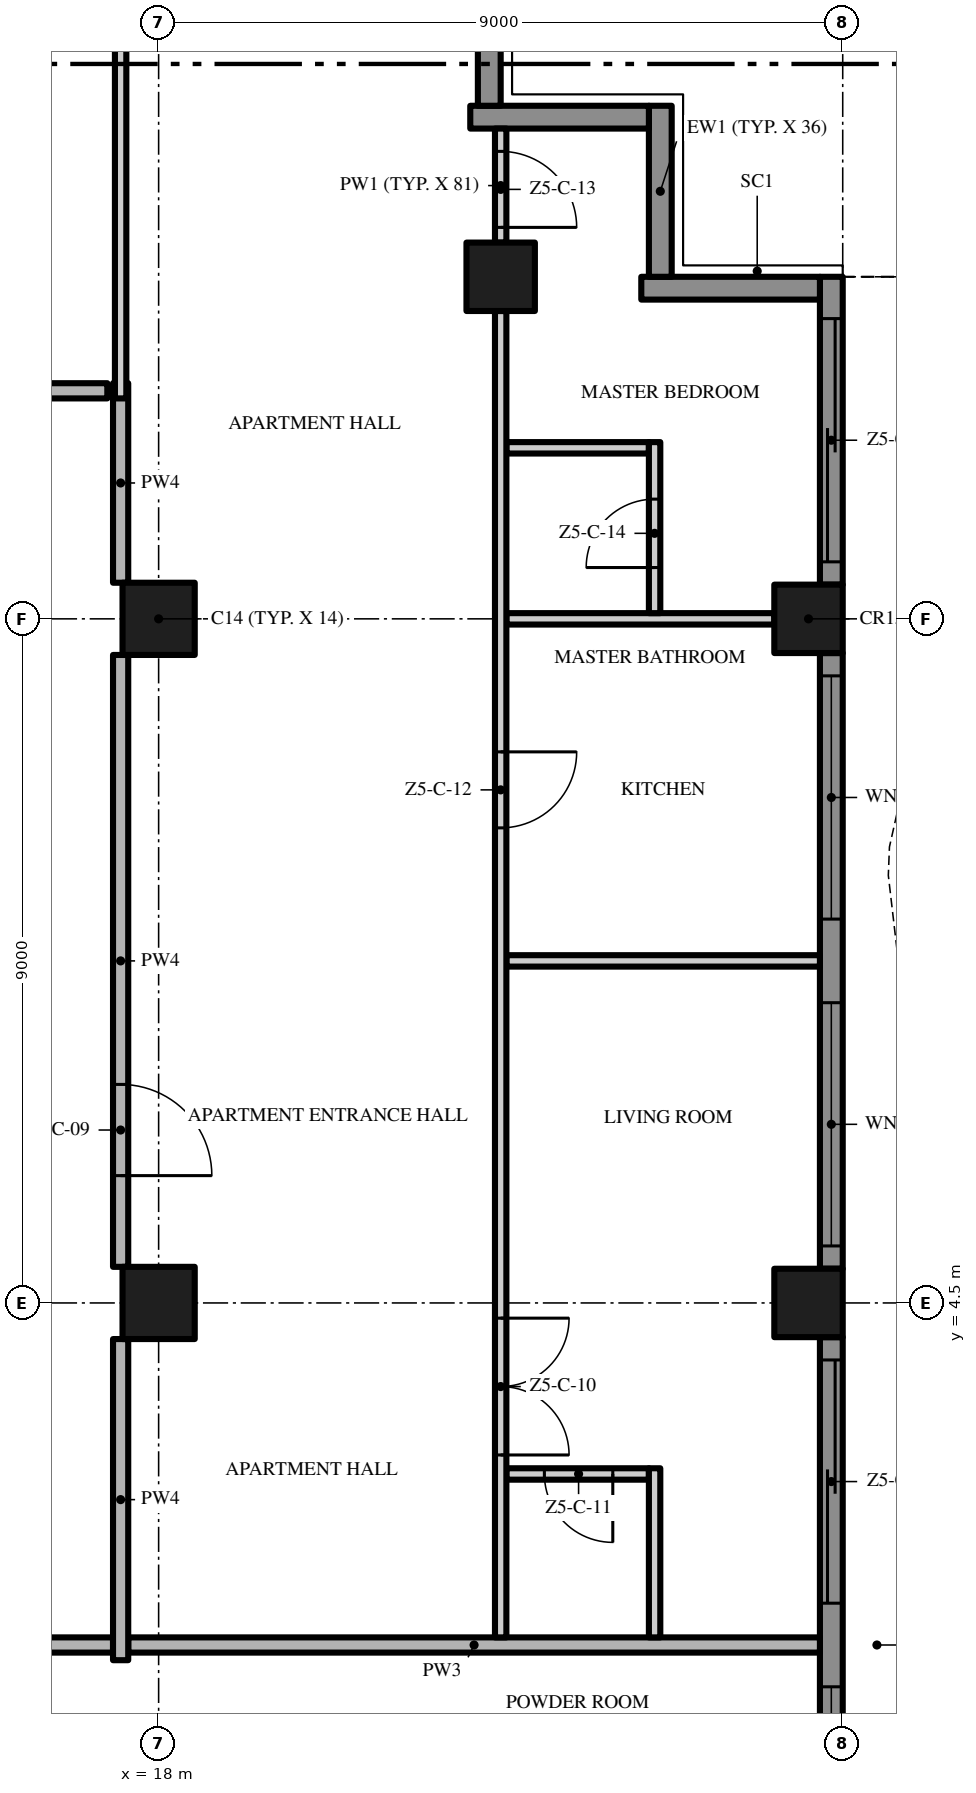
"""IFC4 building model, lengths in metres.
Left out: names, types, materials, properties, quantities, classifications, styles, units other than length and angle.
Written with IfcOpenShell. Run it as: python <this file> out.ifc"""

import sys

from ifc_helpers import new_model, si_unit, direction, frame, frame_2d, origin, origin_2d, place, context, subcontext, project, spatial, polyline, rectangle, outline, extrude, element, fill, save


model = new_model("IFC4")
c1 = context("Model", 3, precision=1e-05, world=origin(), true_north=direction((0.0, 1.0)))
c2 = subcontext(c1, "Body", "Model", "MODEL_VIEW")
j1 = project(units=[si_unit("LENGTHUNIT", "METRE"), si_unit("PLANEANGLEUNIT", "RADIAN")], contexts=[c1])
p1 = place(None, origin())
s1 = spatial("IfcSite", under=j1, at=p1, CompositionType="ELEMENT")
p2 = place(p1, origin())
s2 = spatial("IfcBuilding", under=s1, at=p2, CompositionType="ELEMENT")
p3 = place(p2, frame((0.0, 0.0, 269.2)))
s3 = spatial("IfcBuildingStorey", under=s2, at=p3, CompositionType="ELEMENT", Elevation=269.2)
for number, where, z_axis, x_axis in (
    (1, (18.0, 13.5, 0.0), (0.0, 0.0, 1.0), (1.0, 0.0, 0.0)),
    (2, (18.0, 4.5, 0.0), (0.0, 0.0, 1.0), (1.0, 0.0, 0.0)),
):
    element("IfcColumn", number, at=place(p3, frame(where, z_axis=z_axis, x_axis=x_axis)), inside=s3, PredefinedType="COLUMN", context=c2, shape_type="SweptSolid", body=[
        extrude(rectangle(XDim=0.95, YDim=0.95, at=origin_2d()), origin(), (0.0, 0.0, 1.0), 3.5),
    ])
for number, where, z_axis, x_axis in (
    (3, (26.55, 13.5, 0.0), (0.0, 0.0, 1.0), (1.0, 0.0, 0.0)),
    (4, (22.5, 18.0, 0.0), (0.0, 0.0, 1.0), (1.0, 0.0, 0.0)),
    (5, (26.55, 4.5, 0.0), (0.0, 0.0, 1.0), (1.0, 0.0, 0.0)),
):
    element("IfcColumn", number, at=place(p3, frame(where, z_axis=z_axis, x_axis=x_axis)), inside=s3, PredefinedType="COLUMN", context=c2, shape_type="SweptSolid", body=[
        extrude(rectangle(XDim=0.9, YDim=0.9, at=origin_2d()), origin(), (0.0, 0.0, 1.0), 3.5),
    ])
p4 = place(p3, frame((26.85, 4.05, 0.0), z_axis=(0.0, 0.0, 1.0), x_axis=(0.0, -1.0, 0.0)))
e6 = element("IfcWall", 6, at=p4, inside=s3, PredefinedType="SOLIDWALL", context=c2, shape_type="SweptSolid", body=[
    extrude(rectangle(XDim=8.1, YDim=0.3, at=frame_2d((4.05, 0.0))), origin(), (0.0, 0.0, 1.0), 3.5),
])
p5 = place(p4, frame((4.6, 0.0, 0.45)))
e7 = element("IfcOpeningElement", 7, at=p5, cuts=e6, PredefinedType="OPENING", context=c2, shape_type="SweptSolid", body=[
    extrude(rectangle(XDim=3.2, YDim=2.65, at=frame_2d((1.6, 1.325))), frame((0.0, 0.16, 0.0), z_axis=(0.0, -1.0, 0.0), x_axis=(1.0, 0.0, 0.0)), (0.0, 0.0, 1.0), 0.32),
])
p6 = place(p4, frame((0.3, 0.0, 0.0)))
e8 = element("IfcOpeningElement", 8, at=p6, cuts=e6, PredefinedType="OPENING", context=c2, shape_type="SweptSolid", body=[
    extrude(rectangle(XDim=3.2, YDim=2.4, at=frame_2d((1.6, 1.2))), frame((0.0, 0.16, 0.0), z_axis=(0.0, -1.0, 0.0), x_axis=(1.0, 0.0, 0.0)), (0.0, 0.0, 1.0), 0.32),
])
p7 = place(p3, frame((26.85, 13.05, 0.0), z_axis=(0.0, 0.0, 1.0), x_axis=(0.0, -1.0, 0.0)))
e9 = element("IfcWall", 9, at=p7, inside=s3, PredefinedType="SOLIDWALL", context=c2, shape_type="SweptSolid", body=[
    extrude(rectangle(XDim=8.1, YDim=0.3, at=frame_2d((4.05, 0.0))), origin(), (0.0, 0.0, 1.0), 3.5),
])
p8 = place(p7, frame((4.6, 0.0, 0.45)))
e10 = element("IfcOpeningElement", 10, at=p8, cuts=e9, PredefinedType="OPENING", context=c2, shape_type="SweptSolid", body=[
    extrude(rectangle(XDim=3.2, YDim=2.65, at=frame_2d((1.6, 1.325))), frame((0.0, 0.16, 0.0), z_axis=(0.0, -1.0, 0.0), x_axis=(1.0, 0.0, 0.0)), (0.0, 0.0, 1.0), 0.32),
])
p9 = place(p7, frame((0.3, 0.0, 0.45)))
e11 = element("IfcOpeningElement", 11, at=p9, cuts=e9, PredefinedType="OPENING", context=c2, shape_type="SweptSolid", body=[
    extrude(rectangle(XDim=3.2, YDim=2.65, at=frame_2d((1.6, 1.325))), frame((0.0, 0.16, 0.0), z_axis=(0.0, -1.0, 0.0), x_axis=(1.0, 0.0, 0.0)), (0.0, 0.0, 1.0), 0.32),
])
p10 = place(p3, frame((26.85, 18.0, 0.0), z_axis=(0.0, 0.0, 1.0), x_axis=(0.0, -1.0, 0.0)))
e12 = element("IfcWall", 12, at=p10, inside=s3, PredefinedType="SOLIDWALL", context=c2, shape_type="SweptSolid", body=[
    extrude(rectangle(XDim=4.05, YDim=0.3, at=frame_2d((2.025, 0.0))), origin(), (0.0, 0.0, 1.0), 3.5),
])
p11 = place(p10, frame((0.55, 0.0, 0.0)))
e13 = element("IfcOpeningElement", 13, at=p11, cuts=e12, PredefinedType="OPENING", context=c2, shape_type="SweptSolid", body=[
    extrude(rectangle(XDim=3.2, YDim=2.4, at=frame_2d((1.6, 1.2))), frame((0.0, 0.16, 0.0), z_axis=(0.0, -1.0, 0.0), x_axis=(1.0, 0.0, 0.0)), (0.0, 0.0, 1.0), 0.32),
])
p12 = place(p3, frame((24.35, 17.85, 0.0), z_axis=(0.0, 0.0, 1.0), x_axis=(1.0, 0.0, 0.0)))
e14 = element("IfcWall", 14, at=p12, inside=s3, PredefinedType="SOLIDWALL", context=c2, shape_type="SweptSolid", body=[
    extrude(rectangle(XDim=2.35, YDim=0.3, at=frame_2d((1.175, 0.0))), origin(), (0.0, 0.0, 1.0), 3.5),
])
p13 = place(p3, frame((24.6, 20.25, 0.0), z_axis=(0.0, 0.0, 1.0), x_axis=(0.0, -1.0, 0.0)))
e15 = element("IfcWall", 15, at=p13, inside=s3, PredefinedType="SOLIDWALL", context=c2, shape_type="SweptSolid", body=[
    extrude(rectangle(XDim=2.25, YDim=0.3, at=frame_2d((1.125, 0.0))), origin(), (0.0, 0.0, 1.0), 3.5),
])
p14 = place(p3, frame((22.1, 20.1, 0.0), z_axis=(0.0, 0.0, 1.0), x_axis=(1.0, 0.0, 0.0)))
e16 = element("IfcWall", 16, at=p14, inside=s3, PredefinedType="SOLIDWALL", context=c2, shape_type="SweptSolid", body=[
    extrude(rectangle(XDim=2.35, YDim=0.3, at=frame_2d((1.175, 0.0))), origin(), (0.0, 0.0, 1.0), 3.5),
])
p15 = place(p3, frame((22.35, 22.5, 0.0), z_axis=(0.0, 0.0, 1.0), x_axis=(0.0, -1.0, 0.0)))
e17 = element("IfcWall", 17, at=p15, inside=s3, PredefinedType="SOLIDWALL", context=c2, shape_type="SweptSolid", body=[
    extrude(rectangle(XDim=2.25, YDim=0.3, at=frame_2d((1.125, 0.0))), origin(), (0.0, 0.0, 1.0), 3.5),
])
p16 = place(p3, origin())
e18 = element("IfcWall", 18, at=p16, inside=s3, PredefinedType="USERDEFINED", context=c2, shape_type="SweptSolid", body=[
    extrude(outline(polyline([(27.951, -18.0), (28.612, -16.5), (29.345, -15.0), (29.869, -13.5), (30.0, -12.375), (29.985, -12.0), (29.649, -10.5), (28.988, -9.0), (28.255, -7.5), (27.731, -6.0), (27.6, -4.875), (27.615, -4.5), (27.951, -3.0), (28.612, -1.5), (29.345, 0.0), (29.869, 1.5), (30.0, 2.625), (29.985, 3.0), (29.649, 4.5), (28.988, 6.0), (28.255, 7.5), (27.731, 9.0), (27.6, 10.125), (27.615, 10.5), (27.951, 12.0), (28.612, 13.5), (29.345, 15.0), (29.869, 16.5), (30.0, 17.625), (29.985, 18.0), (29.735, 17.99), (29.749, 17.635), (29.624, 16.556), (29.114, 15.096), (28.385, 13.605), (27.713, 12.079), (27.366, 10.533), (27.349, 10.115), (27.486, 8.944), (28.024, 7.404), (28.761, 5.895), (29.41, 4.421), (29.736, 2.967), (29.749, 2.635), (29.624, 1.556), (29.114, 0.096), (28.385, -1.395), (27.713, -2.921), (27.366, -4.467), (27.349, -4.885), (27.486, -6.056), (28.024, -7.596), (28.761, -9.105), (29.41, -10.579), (29.736, -12.033), (29.749, -12.365), (29.624, -13.444), (29.114, -14.904), (28.385, -16.395), (27.723, -17.899), (27.951, -18.0)])), origin(), (0.0, 0.0, 1.0), 0.9),
])
p17 = place(p3, frame((17.4, 0.0, 0.0), z_axis=(0.0, 0.0, 1.0), x_axis=(-1.0, 0.0, 0.0)))
e19 = element("IfcWall", 19, at=p17, inside=s3, PredefinedType="PARTITIONING", context=c2, shape_type="SweptSolid", body=[
    extrude(rectangle(XDim=34.8, YDim=0.2, at=frame_2d((17.4, 0.0))), origin(), (0.0, 0.0, 1.0), 3.5),
])
p18 = place(p17, frame((23.4, 0.0, 0.0)))
e20 = element("IfcOpeningElement", 20, at=p18, cuts=e19, PredefinedType="OPENING", context=c2, shape_type="SweptSolid", body=[
    extrude(rectangle(XDim=1.5, YDim=2.4, at=frame_2d((0.75, 1.2))), frame((0.0, 0.11, 0.0), z_axis=(0.0, -1.0, 0.0), x_axis=(1.0, 0.0, 0.0)), (0.0, 0.0, 1.0), 0.22),
])
p19 = place(p17, frame((5.4, 0.0, 0.0)))
e21 = element("IfcOpeningElement", 21, at=p19, cuts=e19, PredefinedType="OPENING", context=c2, shape_type="SweptSolid", body=[
    extrude(rectangle(XDim=1.5, YDim=2.4, at=frame_2d((0.75, 1.2))), frame((0.0, 0.11, 0.0), z_axis=(0.0, -1.0, 0.0), x_axis=(1.0, 0.0, 0.0)), (0.0, 0.0, 1.0), 0.22),
])
p20 = place(p3, frame((17.6, 0.0, 0.0), z_axis=(0.0, 0.0, 1.0), x_axis=(1.0, 0.0, 0.0)))
e22 = element("IfcWall", 22, at=p20, inside=s3, PredefinedType="PARTITIONING", context=c2, shape_type="SweptSolid", body=[
    extrude(rectangle(XDim=9.1, YDim=0.2, at=frame_2d((4.55, 0.0))), origin(), (0.0, 0.0, 1.0), 3.5),
])
p21 = place(p3, frame((24.45, 2.25, 0.0), z_axis=(0.0, 0.0, 1.0), x_axis=(-1.0, 0.0, 0.0)))
e23 = element("IfcWall", 23, at=p21, inside=s3, PredefinedType="PARTITIONING", context=c2, shape_type="SweptSolid", body=[
    extrude(rectangle(XDim=1.875, YDim=0.15, at=frame_2d((0.938, 0.0))), origin(), (0.0, 0.0, 1.0), 3.5),
])
p22 = place(p21, frame((0.475, 0.0, 0.0)))
e24 = element("IfcOpeningElement", 24, at=p22, cuts=e23, PredefinedType="OPENING", context=c2, shape_type="SweptSolid", body=[
    extrude(rectangle(XDim=0.9, YDim=2.1, at=frame_2d((0.45, 1.05))), frame((0.0, 0.085, 0.0), z_axis=(0.0, -1.0, 0.0), x_axis=(1.0, 0.0, 0.0)), (0.0, 0.0, 1.0), 0.17),
])
p23 = place(p3, frame((22.575, 9.0, 0.0), z_axis=(0.0, 0.0, 1.0), x_axis=(1.0, 0.0, 0.0)))
e25 = element("IfcWall", 25, at=p23, inside=s3, PredefinedType="PARTITIONING", context=c2, shape_type="SweptSolid", body=[
    extrude(rectangle(XDim=4.125, YDim=0.15, at=frame_2d((2.062, 0.0))), origin(), (0.0, 0.0, 1.0), 3.5),
])
p24 = place(p3, frame((22.575, 13.5, 0.0), z_axis=(0.0, 0.0, 1.0), x_axis=(1.0, 0.0, 0.0)))
e26 = element("IfcWall", 26, at=p24, inside=s3, PredefinedType="PARTITIONING", context=c2, shape_type="SweptSolid", body=[
    extrude(rectangle(XDim=3.525, YDim=0.15, at=frame_2d((1.762, 0.0))), origin(), (0.0, 0.0, 1.0), 3.5),
])
p25 = place(p3, frame((22.575, 15.75, 0.0), z_axis=(0.0, 0.0, 1.0), x_axis=(1.0, 0.0, 0.0)))
e27 = element("IfcWall", 27, at=p25, inside=s3, PredefinedType="PARTITIONING", context=c2, shape_type="SweptSolid", body=[
    extrude(rectangle(XDim=1.875, YDim=0.15, at=frame_2d((0.938, 0.0))), origin(), (0.0, 0.0, 1.0), 3.5),
])
p26 = place(p3, frame((13.5, 16.5, 0.0), z_axis=(0.0, 0.0, 1.0), x_axis=(1.0, 0.0, 0.0)))
e28 = element("IfcWall", 28, at=p26, inside=s3, PredefinedType="PARTITIONING", context=c2, shape_type="SweptSolid", body=[
    extrude(rectangle(XDim=3.825, YDim=0.2, at=frame_2d((1.913, 0.0))), origin(), (0.0, 0.0, 1.0), 3.5),
])
p27 = place(p26, frame((1.55, 0.0, 0.0)))
e29 = element("IfcOpeningElement", 29, at=p27, cuts=e28, PredefinedType="OPENING", context=c2, shape_type="SweptSolid", body=[
    extrude(rectangle(XDim=0.9, YDim=2.1, at=frame_2d((0.45, 1.05))), frame((0.0, 0.11, 0.0), z_axis=(0.0, -1.0, 0.0), x_axis=(1.0, 0.0, 0.0)), (0.0, 0.0, 1.0), 0.22),
])
p28 = place(p3, frame((17.5, -0.2, 0.0), z_axis=(0.0, 0.0, 1.0), x_axis=(0.0, 1.0, 0.0)))
e30 = element("IfcWall", 30, at=p28, inside=s3, PredefinedType="PARTITIONING", context=c2, shape_type="SweptSolid", body=[
    extrude(rectangle(XDim=4.225, YDim=0.2, at=frame_2d((2.112, 0.0))), origin(), (0.0, 0.0, 1.0), 3.5),
])
p29 = place(p3, frame((17.5, 13.025, 0.0), z_axis=(0.0, 0.0, 1.0), x_axis=(0.0, -1.0, 0.0)))
e31 = element("IfcWall", 31, at=p29, inside=s3, PredefinedType="PARTITIONING", context=c2, shape_type="SweptSolid", body=[
    extrude(rectangle(XDim=8.05, YDim=0.2, at=frame_2d((4.025, 0.0))), origin(), (0.0, 0.0, 1.0), 3.5),
])
p30 = place(p29, frame((5.65, 0.0, 0.0)))
e32 = element("IfcOpeningElement", 32, at=p30, cuts=e31, PredefinedType="OPENING", context=c2, shape_type="SweptSolid", body=[
    extrude(rectangle(XDim=1.2, YDim=2.4, at=frame_2d((0.6, 1.2))), frame((0.0, 0.11, 0.0), z_axis=(0.0, -1.0, 0.0), x_axis=(1.0, 0.0, 0.0)), (0.0, 0.0, 1.0), 0.22),
])
p31 = place(p3, frame((17.5, 13.975, 0.0), z_axis=(0.0, 0.0, 1.0), x_axis=(0.0, 1.0, 0.0)))
e33 = element("IfcWall", 33, at=p31, inside=s3, PredefinedType="PARTITIONING", context=c2, shape_type="SweptSolid", body=[
    extrude(rectangle(XDim=2.625, YDim=0.2, at=frame_2d((1.312, 0.0))), origin(), (0.0, 0.0, 1.0), 3.5),
])
p32 = place(p3, frame((17.5, 16.4, 0.0), z_axis=(0.0, 0.0, 1.0), x_axis=(0.0, 1.0, 0.0)))
e34 = element("IfcWall", 34, at=p32, inside=s3, PredefinedType="PARTITIONING", context=c2, shape_type="SweptSolid", body=[
    extrude(rectangle(XDim=5.2, YDim=0.15, at=frame_2d((2.6, 0.0))), origin(), (0.0, 0.0, 1.0), 3.5),
])
p33 = place(p3, frame((22.5, 17.55, 0.0), z_axis=(0.0, 0.0, 1.0), x_axis=(0.0, -1.0, 0.0)))
e35 = element("IfcWall", 35, at=p33, inside=s3, PredefinedType="PARTITIONING", context=c2, shape_type="SweptSolid", body=[
    extrude(rectangle(XDim=17.45, YDim=0.15, at=frame_2d((8.725, 0.0))), origin(), (0.0, 0.0, 1.0), 3.5),
])
p34 = place(p33, frame((13.25, 0.0, 0.0)))
e36 = element("IfcOpeningElement", 36, at=p34, cuts=e35, PredefinedType="OPENING", context=c2, shape_type="SweptSolid", body=[
    extrude(rectangle(XDim=1.8, YDim=2.4, at=frame_2d((0.9, 1.2))), frame((0.0, 0.085, 0.0), z_axis=(0.0, -1.0, 0.0), x_axis=(1.0, 0.0, 0.0)), (0.0, 0.0, 1.0), 0.17),
])
p35 = place(p33, frame((5.8, 0.0, 0.0)))
e37 = element("IfcOpeningElement", 37, at=p35, cuts=e35, PredefinedType="OPENING", context=c2, shape_type="SweptSolid", body=[
    extrude(rectangle(XDim=1.0, YDim=2.4, at=frame_2d((0.5, 1.2))), frame((0.0, 0.085, 0.0), z_axis=(0.0, -1.0, 0.0), x_axis=(1.0, 0.0, 0.0)), (0.0, 0.0, 1.0), 0.17),
])
p36 = place(p3, frame((22.5, 19.95, 0.0), z_axis=(0.0, 0.0, 1.0), x_axis=(0.0, -1.0, 0.0)))
e38 = element("IfcWall", 38, at=p36, inside=s3, PredefinedType="PARTITIONING", context=c2, shape_type="SweptSolid", body=[
    extrude(rectangle(XDim=1.5, YDim=0.15, at=frame_2d((0.75, 0.0))), origin(), (0.0, 0.0, 1.0), 3.5),
])
p37 = place(p36, frame((0.3, 0.0, 0.0)))
e39 = element("IfcOpeningElement", 39, at=p37, cuts=e38, PredefinedType="OPENING", context=c2, shape_type="SweptSolid", body=[
    extrude(rectangle(XDim=1.0, YDim=2.4, at=frame_2d((0.5, 1.2))), frame((0.0, 0.085, 0.0), z_axis=(0.0, -1.0, 0.0), x_axis=(1.0, 0.0, 0.0)), (0.0, 0.0, 1.0), 0.17),
])
p38 = place(p3, frame((24.525, 0.1, 0.0), z_axis=(0.0, 0.0, 1.0), x_axis=(0.0, 1.0, 0.0)))
e40 = element("IfcWall", 40, at=p38, inside=s3, PredefinedType="PARTITIONING", context=c2, shape_type="SweptSolid", body=[
    extrude(rectangle(XDim=2.225, YDim=0.15, at=frame_2d((1.113, 0.0))), origin(), (0.0, 0.0, 1.0), 3.5),
])
p39 = place(p3, frame((24.525, 13.575, 0.0), z_axis=(0.0, 0.0, 1.0), x_axis=(0.0, 1.0, 0.0)))
e41 = element("IfcWall", 41, at=p39, inside=s3, PredefinedType="PARTITIONING", context=c2, shape_type="SweptSolid", body=[
    extrude(rectangle(XDim=2.25, YDim=0.15, at=frame_2d((1.125, 0.0))), origin(), (0.0, 0.0, 1.0), 3.5),
])
p40 = place(p39, frame((0.6, 0.0, 0.0)))
e42 = element("IfcOpeningElement", 42, at=p40, cuts=e41, PredefinedType="OPENING", context=c2, shape_type="SweptSolid", body=[
    extrude(rectangle(XDim=0.9, YDim=2.1, at=frame_2d((0.45, 1.05))), frame((0.0, 0.085, 0.0), z_axis=(0.0, -1.0, 0.0), x_axis=(1.0, 0.0, 0.0)), (0.0, 0.0, 1.0), 0.17),
])
p41 = place(p5, origin())
e43 = element("IfcWindow", 43, at=p41, inside=s3, PartitioningType="SINGLE_PANEL", PredefinedType="WINDOW", context=c2, shape_type="SweptSolid", body=[
    extrude(rectangle(XDim=3.2, YDim=2.65, at=frame_2d((1.6, 1.325))), frame((0.0, 0.03, 0.0), z_axis=(0.0, -1.0, 0.0), x_axis=(1.0, 0.0, 0.0)), (0.0, 0.0, 1.0), 0.06),
])
fill(e7, e43)
p42 = place(p6, origin())
e44 = element("IfcDoor", 44, at=p42, inside=s3, OperationType="SINGLE_SWING_LEFT", PredefinedType="DOOR", context=c2, shape_type="SweptSolid", body=[
    extrude(rectangle(XDim=3.2, YDim=2.4, at=frame_2d((1.6, 1.2))), frame((0.0, 0.025, 0.0), z_axis=(0.0, -1.0, 0.0), x_axis=(1.0, 0.0, 0.0)), (0.0, 0.0, 1.0), 0.05),
])
fill(e8, e44)
p43 = place(p8, origin())
e45 = element("IfcWindow", 45, at=p43, inside=s3, PartitioningType="SINGLE_PANEL", PredefinedType="WINDOW", context=c2, shape_type="SweptSolid", body=[
    extrude(rectangle(XDim=3.2, YDim=2.65, at=frame_2d((1.6, 1.325))), frame((0.0, 0.03, 0.0), z_axis=(0.0, -1.0, 0.0), x_axis=(1.0, 0.0, 0.0)), (0.0, 0.0, 1.0), 0.06),
])
fill(e10, e45)
p44 = place(p9, origin())
e46 = element("IfcWindow", 46, at=p44, inside=s3, PartitioningType="SINGLE_PANEL", PredefinedType="WINDOW", context=c2, shape_type="SweptSolid", body=[
    extrude(rectangle(XDim=3.2, YDim=2.65, at=frame_2d((1.6, 1.325))), frame((0.0, 0.03, 0.0), z_axis=(0.0, -1.0, 0.0), x_axis=(1.0, 0.0, 0.0)), (0.0, 0.0, 1.0), 0.06),
])
fill(e11, e46)
p45 = place(p11, origin())
e47 = element("IfcDoor", 47, at=p45, inside=s3, OperationType="SINGLE_SWING_LEFT", PredefinedType="DOOR", context=c2, shape_type="SweptSolid", body=[
    extrude(rectangle(XDim=3.2, YDim=2.4, at=frame_2d((1.6, 1.2))), frame((0.0, 0.025, 0.0), z_axis=(0.0, -1.0, 0.0), x_axis=(1.0, 0.0, 0.0)), (0.0, 0.0, 1.0), 0.05),
])
fill(e13, e47)
p46 = place(p30, origin())
e48 = element("IfcDoor", 48, at=p46, inside=s3, OperationType="SINGLE_SWING_RIGHT", PredefinedType="DOOR", context=c2, shape_type="SweptSolid", body=[
    extrude(rectangle(XDim=1.2, YDim=2.4, at=frame_2d((0.6, 1.2))), frame((0.0, 0.025, 0.0), z_axis=(0.0, -1.0, 0.0), x_axis=(1.0, 0.0, 0.0)), (0.0, 0.0, 1.0), 0.05),
])
fill(e32, e48)
p47 = place(p34, origin())
e49 = element("IfcDoor", 49, at=p47, inside=s3, OperationType="DOUBLE_DOOR_SINGLE_SWING", PredefinedType="DOOR", context=c2, shape_type="SweptSolid", body=[
    extrude(rectangle(XDim=1.8, YDim=2.4, at=frame_2d((0.9, 1.2))), frame((0.0, 0.025, 0.0), z_axis=(0.0, -1.0, 0.0), x_axis=(1.0, 0.0, 0.0)), (0.0, 0.0, 1.0), 0.05),
])
fill(e36, e49)
p48 = place(p22, origin())
e50 = element("IfcDoor", 50, at=p48, inside=s3, OperationType="SINGLE_SWING_LEFT", PredefinedType="DOOR", context=c2, shape_type="SweptSolid", body=[
    extrude(rectangle(XDim=0.9, YDim=2.1, at=frame_2d((0.45, 1.05))), frame((0.0, 0.025, 0.0), z_axis=(0.0, -1.0, 0.0), x_axis=(1.0, 0.0, 0.0)), (0.0, 0.0, 1.0), 0.05),
])
fill(e24, e50)
p49 = place(p35, origin())
e51 = element("IfcDoor", 51, at=p49, inside=s3, OperationType="SINGLE_SWING_LEFT", PredefinedType="DOOR", context=c2, shape_type="SweptSolid", body=[
    extrude(rectangle(XDim=1.0, YDim=2.4, at=frame_2d((0.5, 1.2))), frame((0.0, 0.025, 0.0), z_axis=(0.0, -1.0, 0.0), x_axis=(1.0, 0.0, 0.0)), (0.0, 0.0, 1.0), 0.05),
])
fill(e37, e51)
p50 = place(p37, origin())
e52 = element("IfcDoor", 52, at=p50, inside=s3, OperationType="SINGLE_SWING_RIGHT", PredefinedType="DOOR", context=c2, shape_type="SweptSolid", body=[
    extrude(rectangle(XDim=1.0, YDim=2.4, at=frame_2d((0.5, 1.2))), frame((0.0, 0.025, 0.0), z_axis=(0.0, -1.0, 0.0), x_axis=(1.0, 0.0, 0.0)), (0.0, 0.0, 1.0), 0.05),
])
fill(e39, e52)
p51 = place(p40, origin())
e53 = element("IfcDoor", 53, at=p51, inside=s3, OperationType="SINGLE_SWING_LEFT", PredefinedType="DOOR", context=c2, shape_type="SweptSolid", body=[
    extrude(rectangle(XDim=0.9, YDim=2.1, at=frame_2d((0.45, 1.05))), frame((0.0, 0.025, 0.0), z_axis=(0.0, -1.0, 0.0), x_axis=(1.0, 0.0, 0.0)), (0.0, 0.0, 1.0), 0.05),
])
fill(e42, e53)
save(model, sys.argv[1])
